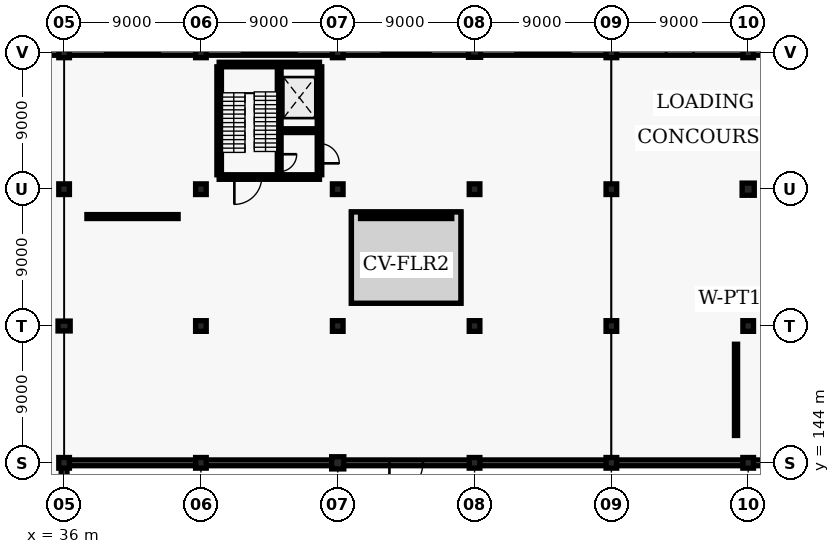
"""IFC4 building model, lengths in metres.
Left out: names, types, materials, properties, quantities, classifications, styles, units other than length and angle.
Written with IfcOpenShell. Run it as: python <this file> out.ifc"""

import sys

from ifc_helpers import new_model, si_unit, direction, frame, frame_2d, origin, origin_2d, place, context, subcontext, project, spatial, rectangle, circle, extrude, element, fill, save


model = new_model("IFC4")
c1 = context("Model", 3, precision=1e-05, world=origin(), true_north=direction((0.0, 1.0)))
c2 = subcontext(c1, "Body", "Model", "MODEL_VIEW")
j1 = project(units=[si_unit("LENGTHUNIT", "METRE"), si_unit("PLANEANGLEUNIT", "RADIAN")], contexts=[c1])
p1 = place(None, origin())
s1 = spatial("IfcSite", under=j1, at=p1, CompositionType="ELEMENT")
p2 = place(p1, origin())
s2 = spatial("IfcBuilding", under=s1, at=p2, CompositionType="ELEMENT")
p3 = place(p2, origin())
s3 = spatial("IfcBuildingStorey", under=s2, at=p3, CompositionType="ELEMENT", Elevation=0.0)
p4 = place(p3, frame((36.0, 144.0, 0.0), z_axis=(0.0, 0.0, 1.0), x_axis=(1.0, 0.0, 0.0)))
e1 = element("IfcColumn", 1, at=p4, inside=s3, PredefinedType="COLUMN", context=c2, shape_type="SweptSolid", body=[
    extrude(rectangle(XDim=0.7, YDim=0.7, at=origin_2d()), origin(), (0.0, 0.0, 1.0), 5.4),
])
p5 = place(p3, frame((36.0, 153.0, 0.0), z_axis=(0.0, 0.0, 1.0), x_axis=(1.0, 0.0, 0.0)))
e2 = element("IfcColumn", 2, at=p5, inside=s3, PredefinedType="COLUMN", context=c2, shape_type="SweptSolid", body=[
    extrude(rectangle(XDim=0.8, YDim=0.65, at=origin_2d()), origin(), (0.0, 0.0, 1.0), 5.4),
])
for number, where, z_axis, x_axis in (
    (3, (36.0, 162.0, 0.0), (0.0, 0.0, 1.0), (1.0, 0.0, 0.0)),
    (4, (36.0, 171.0, 0.0), (0.0, 0.0, 1.0), (1.0, 0.0, 0.0)),
    (5, (45.0, 144.0, 0.0), (0.0, 0.0, 1.0), (1.0, 0.0, 0.0)),
    (6, (45.0, 153.0, 0.0), (0.0, 0.0, 1.0), (1.0, 0.0, 0.0)),
    (7, (45.0, 162.0, 0.0), (0.0, 0.0, 1.0), (1.0, 0.0, 0.0)),
    (8, (45.0, 171.0, 0.0), (0.0, 0.0, 1.0), (1.0, 0.0, 0.0)),
):
    element("IfcColumn", number, at=place(p3, frame(where, z_axis=z_axis, x_axis=x_axis)), inside=s3, PredefinedType="COLUMN", context=c2, shape_type="SweptSolid", body=[
        extrude(rectangle(XDim=0.7, YDim=0.7, at=origin_2d()), origin(), (0.0, 0.0, 1.0), 5.4),
    ])
p6 = place(p3, frame((54.0, 144.0, 0.0), z_axis=(0.0, 0.0, 1.0), x_axis=(1.0, 0.0, 0.0)))
e9 = element("IfcColumn", 9, at=p6, inside=s3, PredefinedType="COLUMN", context=c2, shape_type="SweptSolid", body=[
    extrude(circle(Radius=0.4, at=origin_2d()), origin(), (0.0, 0.0, 1.0), 5.4),
])
for number, where, z_axis, x_axis in (
    (10, (54.0, 153.0, 0.0), (0.0, 0.0, 1.0), (1.0, 0.0, 0.0)),
    (11, (54.0, 162.0, 0.0), (0.0, 0.0, 1.0), (1.0, 0.0, 0.0)),
    (12, (54.0, 171.0, 0.0), (0.0, 0.0, 1.0), (1.0, 0.0, 0.0)),
    (13, (63.0, 144.0, 0.0), (0.0, 0.0, 1.0), (1.0, 0.0, 0.0)),
    (14, (63.0, 153.0, 0.0), (0.0, 0.0, 1.0), (1.0, 0.0, 0.0)),
    (15, (63.0, 162.0, 0.0), (0.0, 0.0, 1.0), (1.0, 0.0, 0.0)),
):
    element("IfcColumn", number, at=place(p3, frame(where, z_axis=z_axis, x_axis=x_axis)), inside=s3, PredefinedType="COLUMN", context=c2, shape_type="SweptSolid", body=[
        extrude(rectangle(XDim=0.7, YDim=0.7, at=origin_2d()), origin(), (0.0, 0.0, 1.0), 5.4),
    ])
p7 = place(p3, frame((63.0, 171.0, 0.0), z_axis=(0.0, 0.0, 1.0), x_axis=(1.0, 0.0, 0.0)))
e16 = element("IfcColumn", 16, at=p7, inside=s3, PredefinedType="COLUMN", context=c2, shape_type="SweptSolid", body=[
    extrude(rectangle(XDim=0.8, YDim=0.65, at=origin_2d()), origin(), (0.0, 0.0, 1.0), 5.4),
])
for number, where, z_axis, x_axis in (
    (17, (72.0, 144.0, 0.0), (0.0, 0.0, 1.0), (1.0, 0.0, 0.0)),
    (18, (72.0, 153.0, 0.0), (0.0, 0.0, 1.0), (1.0, 0.0, 0.0)),
    (19, (72.0, 162.0, 0.0), (0.0, 0.0, 1.0), (1.0, 0.0, 0.0)),
    (20, (72.0, 171.0, 0.0), (0.0, 0.0, 1.0), (1.0, 0.0, 0.0)),
    (21, (81.0, 144.0, 0.0), (0.0, 0.0, 1.0), (1.0, 0.0, 0.0)),
    (22, (81.0, 153.0, 0.0), (0.0, 0.0, 1.0), (1.0, 0.0, 0.0)),
):
    element("IfcColumn", number, at=place(p3, frame(where, z_axis=z_axis, x_axis=x_axis)), inside=s3, PredefinedType="COLUMN", context=c2, shape_type="SweptSolid", body=[
        extrude(rectangle(XDim=0.7, YDim=0.7, at=origin_2d()), origin(), (0.0, 0.0, 1.0), 5.4),
    ])
p8 = place(p3, frame((81.0, 162.0, 0.0), z_axis=(0.0, 0.0, 1.0), x_axis=(1.0, 0.0, 0.0)))
e23 = element("IfcColumn", 23, at=p8, inside=s3, PredefinedType="COLUMN", context=c2, shape_type="SweptSolid", body=[
    extrude(circle(Radius=0.4, at=origin_2d()), origin(), (0.0, 0.0, 1.0), 5.4),
])
p9 = place(p3, frame((81.0, 171.0, 0.0), z_axis=(0.0, 0.0, 1.0), x_axis=(1.0, 0.0, 0.0)))
e24 = element("IfcColumn", 24, at=p9, inside=s3, PredefinedType="COLUMN", context=c2, shape_type="SweptSolid", body=[
    extrude(rectangle(XDim=0.7, YDim=0.7, at=origin_2d()), origin(), (0.0, 0.0, 1.0), 5.4),
])
p10 = place(p3, frame((27.06, 171.0, 0.0), z_axis=(0.0, 0.0, 1.0), x_axis=(1.0, 0.0, 0.0)))
e25 = element("IfcWall", 25, at=p10, inside=s3, PredefinedType="SOLIDWALL", context=c2, shape_type="SweptSolid", body=[
    extrude(rectangle(XDim=8.88, YDim=0.38, at=frame_2d((4.44, 0.0))), origin(), (0.0, 0.0, 1.0), 4.55),
])
p11 = place(p3, frame((36.06, 171.0, 0.0), z_axis=(0.0, 0.0, 1.0), x_axis=(1.0, 0.0, 0.0)))
e26 = element("IfcWall", 26, at=p11, inside=s3, PredefinedType="SOLIDWALL", context=c2, shape_type="SweptSolid", body=[
    extrude(rectangle(XDim=8.88, YDim=0.38, at=frame_2d((4.44, 0.0))), origin(), (0.0, 0.0, 1.0), 4.55),
])
p12 = place(p11, frame((2.64, 0.0, 0.0)))
e27 = element("IfcOpeningElement", 27, at=p12, cuts=e26, PredefinedType="OPENING", context=c2, shape_type="SweptSolid", body=[
    extrude(rectangle(XDim=3.6, YDim=4.0, at=frame_2d((1.8, 2.0))), frame((0.0, 0.2, 0.0), z_axis=(0.0, -1.0, 0.0), x_axis=(1.0, 0.0, 0.0)), (0.0, 0.0, 1.0), 0.4),
])
p13 = place(p3, frame((45.06, 171.0, 0.0), z_axis=(0.0, 0.0, 1.0), x_axis=(1.0, 0.0, 0.0)))
e28 = element("IfcWall", 28, at=p13, inside=s3, PredefinedType="SOLIDWALL", context=c2, shape_type="SweptSolid", body=[
    extrude(rectangle(XDim=8.88, YDim=0.38, at=frame_2d((4.44, 0.0))), origin(), (0.0, 0.0, 1.0), 4.55),
])
p14 = place(p13, frame((2.64, 0.0, 0.0)))
e29 = element("IfcOpeningElement", 29, at=p14, cuts=e28, PredefinedType="OPENING", context=c2, shape_type="SweptSolid", body=[
    extrude(rectangle(XDim=3.6, YDim=4.0, at=frame_2d((1.8, 2.0))), frame((0.0, 0.2, 0.0), z_axis=(0.0, -1.0, 0.0), x_axis=(1.0, 0.0, 0.0)), (0.0, 0.0, 1.0), 0.4),
])
p15 = place(p3, frame((54.06, 171.0, 0.0), z_axis=(0.0, 0.0, 1.0), x_axis=(1.0, 0.0, 0.0)))
e30 = element("IfcWall", 30, at=p15, inside=s3, PredefinedType="SOLIDWALL", context=c2, shape_type="SweptSolid", body=[
    extrude(rectangle(XDim=8.88, YDim=0.38, at=frame_2d((4.44, 0.0))), origin(), (0.0, 0.0, 1.0), 4.55),
])
p16 = place(p15, frame((2.84, 0.0, 0.0)))
e31 = element("IfcOpeningElement", 31, at=p16, cuts=e30, PredefinedType="OPENING", context=c2, shape_type="SweptSolid", body=[
    extrude(rectangle(XDim=3.2, YDim=3.6, at=frame_2d((1.6, 1.8))), frame((0.0, 0.2, 0.0), z_axis=(0.0, -1.0, 0.0), x_axis=(1.0, 0.0, 0.0)), (0.0, 0.0, 1.0), 0.4),
])
p17 = place(p3, frame((63.06, 171.0, 0.0), z_axis=(0.0, 0.0, 1.0), x_axis=(1.0, 0.0, 0.0)))
e32 = element("IfcWall", 32, at=p17, inside=s3, PredefinedType="SOLIDWALL", context=c2, shape_type="SweptSolid", body=[
    extrude(rectangle(XDim=8.88, YDim=0.38, at=frame_2d((4.44, 0.0))), origin(), (0.0, 0.0, 1.0), 4.55),
])
p18 = place(p17, frame((2.64, 0.0, 0.0)))
e33 = element("IfcOpeningElement", 33, at=p18, cuts=e32, PredefinedType="OPENING", context=c2, shape_type="SweptSolid", body=[
    extrude(rectangle(XDim=3.6, YDim=4.0, at=frame_2d((1.8, 2.0))), frame((0.0, 0.2, 0.0), z_axis=(0.0, -1.0, 0.0), x_axis=(1.0, 0.0, 0.0)), (0.0, 0.0, 1.0), 0.4),
])
p19 = place(p3, frame((72.06, 171.0, 0.0), z_axis=(0.0, 0.0, 1.0), x_axis=(1.0, 0.0, 0.0)))
e34 = element("IfcWall", 34, at=p19, inside=s3, PredefinedType="SOLIDWALL", context=c2, shape_type="SweptSolid", body=[
    extrude(rectangle(XDim=8.88, YDim=0.38, at=frame_2d((4.44, 0.0))), origin(), (0.0, 0.0, 1.0), 4.55),
])
p20 = place(p19, frame((3.54, 0.0, 0.0)))
e35 = element("IfcOpeningElement", 35, at=p20, cuts=e34, PredefinedType="OPENING", context=c2, shape_type="SweptSolid", body=[
    extrude(rectangle(XDim=1.8, YDim=2.15, at=frame_2d((0.9, 1.075))), frame((0.0, 0.2, 0.0), z_axis=(0.0, -1.0, 0.0), x_axis=(1.0, 0.0, 0.0)), (0.0, 0.0, 1.0), 0.4),
])
p21 = place(p3, frame((81.06, 171.0, 0.0), z_axis=(0.0, 0.0, 1.0), x_axis=(1.0, 0.0, 0.0)))
e36 = element("IfcWall", 36, at=p21, inside=s3, PredefinedType="SOLIDWALL", context=c2, shape_type="SweptSolid", body=[
    extrude(rectangle(XDim=8.88, YDim=0.38, at=frame_2d((4.44, 0.0))), origin(), (0.0, 0.0, 1.0), 4.55),
])
p22 = place(p21, frame((2.64, 0.0, 0.0)))
e37 = element("IfcOpeningElement", 37, at=p22, cuts=e36, PredefinedType="OPENING", context=c2, shape_type="SweptSolid", body=[
    extrude(rectangle(XDim=3.6, YDim=4.0, at=frame_2d((1.8, 2.0))), frame((0.0, 0.2, 0.0), z_axis=(0.0, -1.0, 0.0), x_axis=(1.0, 0.0, 0.0)), (0.0, 0.0, 1.0), 0.4),
])
for number, where, z_axis, x_axis in (
    (38, (36.0, 135.06, 0.0), (0.0, 0.0, 1.0), (0.0, 1.0, 0.0)),
    (39, (36.06, 144.0, 0.0), (0.0, 0.0, 1.0), (1.0, 0.0, 0.0)),
    (40, (45.06, 144.0, 0.0), (0.0, 0.0, 1.0), (1.0, 0.0, 0.0)),
):
    element("IfcWall", number, at=place(p3, frame(where, z_axis=z_axis, x_axis=x_axis)), inside=s3, PredefinedType="SOLIDWALL", context=c2, shape_type="SweptSolid", body=[
        extrude(rectangle(XDim=8.88, YDim=0.38, at=frame_2d((4.44, 0.0))), origin(), (0.0, 0.0, 1.0), 4.55),
    ])
p23 = place(p3, frame((54.06, 144.0, 0.0), z_axis=(0.0, 0.0, 1.0), x_axis=(1.0, 0.0, 0.0)))
e41 = element("IfcWall", 41, at=p23, inside=s3, PredefinedType="SOLIDWALL", context=c2, shape_type="SweptSolid", body=[
    extrude(rectangle(XDim=8.88, YDim=0.38, at=frame_2d((4.44, 0.0))), origin(), (0.0, 0.0, 1.0), 4.55),
])
p24 = place(p23, frame((3.34, 0.0, 0.0)))
e42 = element("IfcOpeningElement", 42, at=p24, cuts=e41, PredefinedType="OPENING", context=c2, shape_type="SweptSolid", body=[
    extrude(rectangle(XDim=2.2, YDim=2.4, at=frame_2d((1.1, 1.2))), frame((0.0, 0.2, 0.0), z_axis=(0.0, -1.0, 0.0), x_axis=(1.0, 0.0, 0.0)), (0.0, 0.0, 1.0), 0.4),
])
for number, where, z_axis, x_axis in (
    (43, (63.06, 144.0, 0.0), (0.0, 0.0, 1.0), (1.0, 0.0, 0.0)),
    (44, (72.06, 144.0, 0.0), (0.0, 0.0, 1.0), (1.0, 0.0, 0.0)),
    (45, (81.06, 144.0, 0.0), (0.0, 0.0, 1.0), (1.0, 0.0, 0.0)),
):
    element("IfcWall", number, at=place(p3, frame(where, z_axis=z_axis, x_axis=x_axis)), inside=s3, PredefinedType="SOLIDWALL", context=c2, shape_type="SweptSolid", body=[
        extrude(rectangle(XDim=8.88, YDim=0.38, at=frame_2d((4.44, 0.0))), origin(), (0.0, 0.0, 1.0), 4.55),
    ])
p25 = place(p3, frame((46.2, 162.8, 0.0), z_axis=(0.0, 0.0, 1.0), x_axis=(1.0, 0.0, 0.0)))
e46 = element("IfcWall", 46, at=p25, inside=s3, PredefinedType="SHEAR", context=c2, shape_type="SweptSolid", body=[
    extrude(rectangle(XDim=6.6, YDim=0.3, at=frame_2d((3.3, 0.0))), origin(), (0.0, 0.0, 1.0), 5.4),
])
p26 = place(p25, frame((1.0, 0.0, 0.0)))
e47 = element("IfcOpeningElement", 47, at=p26, cuts=e46, PredefinedType="OPENING", context=c2, shape_type="SweptSolid", body=[
    extrude(rectangle(XDim=1.8, YDim=2.15, at=frame_2d((0.9, 1.075))), frame((0.0, 0.16, 0.0), z_axis=(0.0, -1.0, 0.0), x_axis=(1.0, 0.0, 0.0)), (0.0, 0.0, 1.0), 0.32),
])
p27 = place(p3, frame((46.2, 170.2, 0.0), z_axis=(0.0, 0.0, 1.0), x_axis=(1.0, 0.0, 0.0)))
e48 = element("IfcWall", 48, at=p27, inside=s3, PredefinedType="SHEAR", context=c2, shape_type="SweptSolid", body=[
    extrude(rectangle(XDim=6.6, YDim=0.3, at=frame_2d((3.3, 0.0))), origin(), (0.0, 0.0, 1.0), 5.4),
])
p28 = place(p3, frame((46.2, 162.95, 0.0), z_axis=(0.0, 0.0, 1.0), x_axis=(0.0, 1.0, 0.0)))
e49 = element("IfcWall", 49, at=p28, inside=s3, PredefinedType="SHEAR", context=c2, shape_type="SweptSolid", body=[
    extrude(rectangle(XDim=7.1, YDim=0.3, at=frame_2d((3.55, 0.0))), origin(), (0.0, 0.0, 1.0), 5.4),
])
p29 = place(p3, frame((52.8, 162.95, 0.0), z_axis=(0.0, 0.0, 1.0), x_axis=(0.0, 1.0, 0.0)))
e50 = element("IfcWall", 50, at=p29, inside=s3, PredefinedType="SHEAR", context=c2, shape_type="SweptSolid", body=[
    extrude(rectangle(XDim=7.1, YDim=0.3, at=frame_2d((3.55, 0.0))), origin(), (0.0, 0.0, 1.0), 5.4),
])
p30 = place(p29, frame((0.75, 0.0, 0.0)))
e51 = element("IfcOpeningElement", 51, at=p30, cuts=e50, PredefinedType="OPENING", context=c2, shape_type="SweptSolid", body=[
    extrude(rectangle(XDim=1.3, YDim=2.15, at=frame_2d((0.65, 1.075))), frame((0.0, 0.16, 0.0), z_axis=(0.0, -1.0, 0.0), x_axis=(1.0, 0.0, 0.0)), (0.0, 0.0, 1.0), 0.32),
])
p31 = place(p3, frame((50.15, 162.95, 0.0), z_axis=(0.0, 0.0, 1.0), x_axis=(0.0, 1.0, 0.0)))
e52 = element("IfcWall", 52, at=p31, inside=s3, PredefinedType="SHEAR", context=c2, shape_type="SweptSolid", body=[
    extrude(rectangle(XDim=7.1, YDim=0.25, at=frame_2d((3.55, 0.0))), origin(), (0.0, 0.0, 1.0), 5.4),
])
p32 = place(p31, frame((0.2, 0.0, 0.0)))
e53 = element("IfcOpeningElement", 53, at=p32, cuts=e52, PredefinedType="OPENING", context=c2, shape_type="SweptSolid", body=[
    extrude(rectangle(XDim=1.15, YDim=2.15, at=frame_2d((0.575, 1.075))), frame((0.0, 0.135, 0.0), z_axis=(0.0, -1.0, 0.0), x_axis=(1.0, 0.0, 0.0)), (0.0, 0.0, 1.0), 0.27),
])
p33 = place(p3, frame((50.27, 165.85, 0.0), z_axis=(0.0, 0.0, 1.0), x_axis=(1.0, 0.0, 0.0)))
e54 = element("IfcWall", 54, at=p33, inside=s3, PredefinedType="SHEAR", context=c2, shape_type="SweptSolid", body=[
    extrude(rectangle(XDim=2.38, YDim=0.25, at=frame_2d((1.19, 0.0))), origin(), (0.0, 0.0, 1.0), 5.4),
])
p34 = place(p33, frame((0.39, 0.0, 0.0)))
e55 = element("IfcOpeningElement", 55, at=p34, cuts=e54, PredefinedType="OPENING", context=c2, shape_type="SweptSolid", body=[
    extrude(rectangle(XDim=1.6, YDim=2.3, at=frame_2d((0.8, 1.15))), frame((0.0, 0.135, 0.0), z_axis=(0.0, -1.0, 0.0), x_axis=(1.0, 0.0, 0.0)), (0.0, 0.0, 1.0), 0.27),
])
p35 = place(p3, frame((37.5, 160.2, 0.0), z_axis=(0.0, 0.0, 1.0), x_axis=(1.0, 0.0, 0.0)))
e56 = element("IfcWall", 56, at=p35, inside=s3, PredefinedType="PARTITIONING", context=c2, shape_type="SweptSolid", body=[
    extrude(rectangle(XDim=6.0, YDim=0.26, at=frame_2d((3.0, 0.0))), origin(), (0.0, 0.0, 1.0), 4.3),
])
p36 = place(p35, frame((2.1, 0.0, 0.0)))
e57 = element("IfcOpeningElement", 57, at=p36, cuts=e56, PredefinedType="OPENING", context=c2, shape_type="SweptSolid", body=[
    extrude(rectangle(XDim=1.8, YDim=2.4, at=frame_2d((0.9, 1.2))), frame((0.0, 0.14, 0.0), z_axis=(0.0, -1.0, 0.0), x_axis=(1.0, 0.0, 0.0)), (0.0, 0.0, 1.0), 0.28),
])
p37 = place(p3, frame((55.5, 160.2, 0.0), z_axis=(0.0, 0.0, 1.0), x_axis=(1.0, 0.0, 0.0)))
e58 = element("IfcWall", 58, at=p37, inside=s3, PredefinedType="PARTITIONING", context=c2, shape_type="SweptSolid", body=[
    extrude(rectangle(XDim=6.0, YDim=0.26, at=frame_2d((3.0, 0.0))), origin(), (0.0, 0.0, 1.0), 4.3),
])
p38 = place(p37, frame((2.025, 0.0, 0.0)))
e59 = element("IfcOpeningElement", 59, at=p38, cuts=e58, PredefinedType="OPENING", context=c2, shape_type="SweptSolid", body=[
    extrude(rectangle(XDim=1.95, YDim=2.5, at=frame_2d((0.975, 1.25))), frame((0.0, 0.14, 0.0), z_axis=(0.0, -1.0, 0.0), x_axis=(1.0, 0.0, 0.0)), (0.0, 0.0, 1.0), 0.28),
])
p39 = place(p3, frame((80.2, 145.8, 0.0), z_axis=(0.0, 0.0, 1.0), x_axis=(0.0, 1.0, 0.0)))
e60 = element("IfcWall", 60, at=p39, inside=s3, PredefinedType="PARTITIONING", context=c2, shape_type="SweptSolid", body=[
    extrude(rectangle(XDim=6.0, YDim=0.205, at=frame_2d((3.0, 0.0))), origin(), (0.0, 0.0, 1.0), 4.3),
])
p40 = place(p39, frame((2.1, 0.0, 0.0)))
e61 = element("IfcOpeningElement", 61, at=p40, cuts=e60, PredefinedType="OPENING", context=c2, shape_type="SweptSolid", body=[
    extrude(rectangle(XDim=1.8, YDim=2.4, at=frame_2d((0.9, 1.2))), frame((0.0, 0.113, 0.0), z_axis=(0.0, -1.0, 0.0), x_axis=(1.0, 0.0, 0.0)), (0.0, 0.0, 1.0), 0.225),
])
p41 = place(p12, origin())
e62 = element("IfcDoor", 62, at=p41, inside=s3, OperationType="ROLLINGUP", PredefinedType="GATE", context=c2, shape_type="SweptSolid", body=[
    extrude(rectangle(XDim=3.6, YDim=4.0, at=frame_2d((1.8, 2.0))), frame((0.0, 0.025, 0.0), z_axis=(0.0, -1.0, 0.0), x_axis=(1.0, 0.0, 0.0)), (0.0, 0.0, 1.0), 0.05),
])
fill(e27, e62)
p42 = place(p14, origin())
e63 = element("IfcDoor", 63, at=p42, inside=s3, OperationType="ROLLINGUP", PredefinedType="GATE", context=c2, shape_type="SweptSolid", body=[
    extrude(rectangle(XDim=3.6, YDim=4.0, at=frame_2d((1.8, 2.0))), frame((0.0, 0.025, 0.0), z_axis=(0.0, -1.0, 0.0), x_axis=(1.0, 0.0, 0.0)), (0.0, 0.0, 1.0), 0.05),
])
fill(e29, e63)
p43 = place(p16, origin())
e64 = element("IfcDoor", 64, at=p43, inside=s3, OperationType="ROLLINGUP", PredefinedType="GATE", context=c2, shape_type="SweptSolid", body=[
    extrude(rectangle(XDim=3.2, YDim=3.6, at=frame_2d((1.6, 1.8))), frame((0.0, 0.025, 0.0), z_axis=(0.0, -1.0, 0.0), x_axis=(1.0, 0.0, 0.0)), (0.0, 0.0, 1.0), 0.05),
])
fill(e31, e64)
p44 = place(p18, origin())
e65 = element("IfcDoor", 65, at=p44, inside=s3, OperationType="ROLLINGUP", PredefinedType="GATE", context=c2, shape_type="SweptSolid", body=[
    extrude(rectangle(XDim=3.6, YDim=4.0, at=frame_2d((1.8, 2.0))), frame((0.0, 0.025, 0.0), z_axis=(0.0, -1.0, 0.0), x_axis=(1.0, 0.0, 0.0)), (0.0, 0.0, 1.0), 0.05),
])
fill(e33, e65)
p45 = place(p20, origin())
e66 = element("IfcDoor", 66, at=p45, inside=s3, OperationType="DOUBLE_DOOR_SINGLE_SWING", PredefinedType="DOOR", context=c2, shape_type="SweptSolid", body=[
    extrude(rectangle(XDim=1.8, YDim=2.15, at=frame_2d((0.9, 1.075))), frame((0.0, 0.025, 0.0), z_axis=(0.0, -1.0, 0.0), x_axis=(1.0, 0.0, 0.0)), (0.0, 0.0, 1.0), 0.05),
])
fill(e35, e66)
p46 = place(p24, frame((2.2, 0.0, 0.0), z_axis=(0.0, 0.0, 1.0), x_axis=(-1.0, 0.0, 0.0)))
e67 = element("IfcDoor", 67, at=p46, inside=s3, OperationType="DOUBLE_DOOR_SINGLE_SWING", PredefinedType="DOOR", context=c2, shape_type="SweptSolid", body=[
    extrude(rectangle(XDim=2.2, YDim=2.4, at=frame_2d((1.1, 1.2))), frame((0.0, 0.025, 0.0), z_axis=(0.0, -1.0, 0.0), x_axis=(1.0, 0.0, 0.0)), (0.0, 0.0, 1.0), 0.05),
])
fill(e42, e67)
p47 = place(p30, frame((1.3, 0.0, 0.0), z_axis=(0.0, 0.0, 1.0), x_axis=(-1.0, 0.0, 0.0)))
e68 = element("IfcDoor", 68, at=p47, inside=s3, OperationType="DOUBLE_DOOR_SINGLE_SWING", PredefinedType="DOOR", context=c2, shape_type="SweptSolid", body=[
    extrude(rectangle(XDim=1.3, YDim=2.15, at=frame_2d((0.65, 1.075))), frame((0.0, 0.025, 0.0), z_axis=(0.0, -1.0, 0.0), x_axis=(1.0, 0.0, 0.0)), (0.0, 0.0, 1.0), 0.05),
])
fill(e51, e68)
p48 = place(p32, origin())
e69 = element("IfcDoor", 69, at=p48, inside=s3, OperationType="SINGLE_SWING_RIGHT", PredefinedType="DOOR", context=c2, shape_type="SweptSolid", body=[
    extrude(rectangle(XDim=1.15, YDim=2.15, at=frame_2d((0.575, 1.075))), frame((0.0, 0.025, 0.0), z_axis=(0.0, -1.0, 0.0), x_axis=(1.0, 0.0, 0.0)), (0.0, 0.0, 1.0), 0.05),
])
fill(e53, e69)
p49 = place(p26, frame((1.8, 0.0, 0.0), z_axis=(0.0, 0.0, 1.0), x_axis=(-1.0, 0.0, 0.0)))
e70 = element("IfcDoor", 70, at=p49, inside=s3, OperationType="DOUBLE_DOOR_SINGLE_SWING", PredefinedType="DOOR", context=c2, shape_type="SweptSolid", body=[
    extrude(rectangle(XDim=1.8, YDim=2.15, at=frame_2d((0.9, 1.075))), frame((0.0, 0.025, 0.0), z_axis=(0.0, -1.0, 0.0), x_axis=(1.0, 0.0, 0.0)), (0.0, 0.0, 1.0), 0.05),
])
fill(e47, e70)
p50 = place(p34, origin())
e71 = element("IfcDoor", 71, at=p50, inside=s3, OperationType="SLIDING_TO_LEFT", PredefinedType="DOOR", context=c2, shape_type="SweptSolid", body=[
    extrude(rectangle(XDim=1.6, YDim=2.3, at=frame_2d((0.8, 1.15))), frame((0.0, 0.025, 0.0), z_axis=(0.0, -1.0, 0.0), x_axis=(1.0, 0.0, 0.0)), (0.0, 0.0, 1.0), 0.05),
])
fill(e55, e71)
p51 = place(p36, origin())
e72 = element("IfcDoor", 72, at=p51, inside=s3, OperationType="SLIDING_TO_LEFT", PredefinedType="DOOR", context=c2, shape_type="SweptSolid", body=[
    extrude(rectangle(XDim=1.8, YDim=2.4, at=frame_2d((0.9, 1.2))), frame((0.0, 0.025, 0.0), z_axis=(0.0, -1.0, 0.0), x_axis=(1.0, 0.0, 0.0)), (0.0, 0.0, 1.0), 0.05),
])
fill(e57, e72)
p52 = place(p38, origin())
e73 = element("IfcDoor", 73, at=p52, inside=s3, OperationType="SLIDING_TO_RIGHT", PredefinedType="DOOR", context=c2, shape_type="SweptSolid", body=[
    extrude(rectangle(XDim=1.95, YDim=2.5, at=frame_2d((0.975, 1.25))), frame((0.0, 0.025, 0.0), z_axis=(0.0, -1.0, 0.0), x_axis=(1.0, 0.0, 0.0)), (0.0, 0.0, 1.0), 0.05),
])
fill(e59, e73)
p53 = place(p40, origin())
e74 = element("IfcDoor", 74, at=p53, inside=s3, OperationType="SLIDING_TO_RIGHT", PredefinedType="DOOR", context=c2, shape_type="SweptSolid", body=[
    extrude(rectangle(XDim=1.8, YDim=2.4, at=frame_2d((0.9, 1.2))), frame((0.0, 0.025, 0.0), z_axis=(0.0, -1.0, 0.0), x_axis=(1.0, 0.0, 0.0)), (0.0, 0.0, 1.0), 0.05),
])
fill(e61, e74)
save(model, sys.argv[1])
